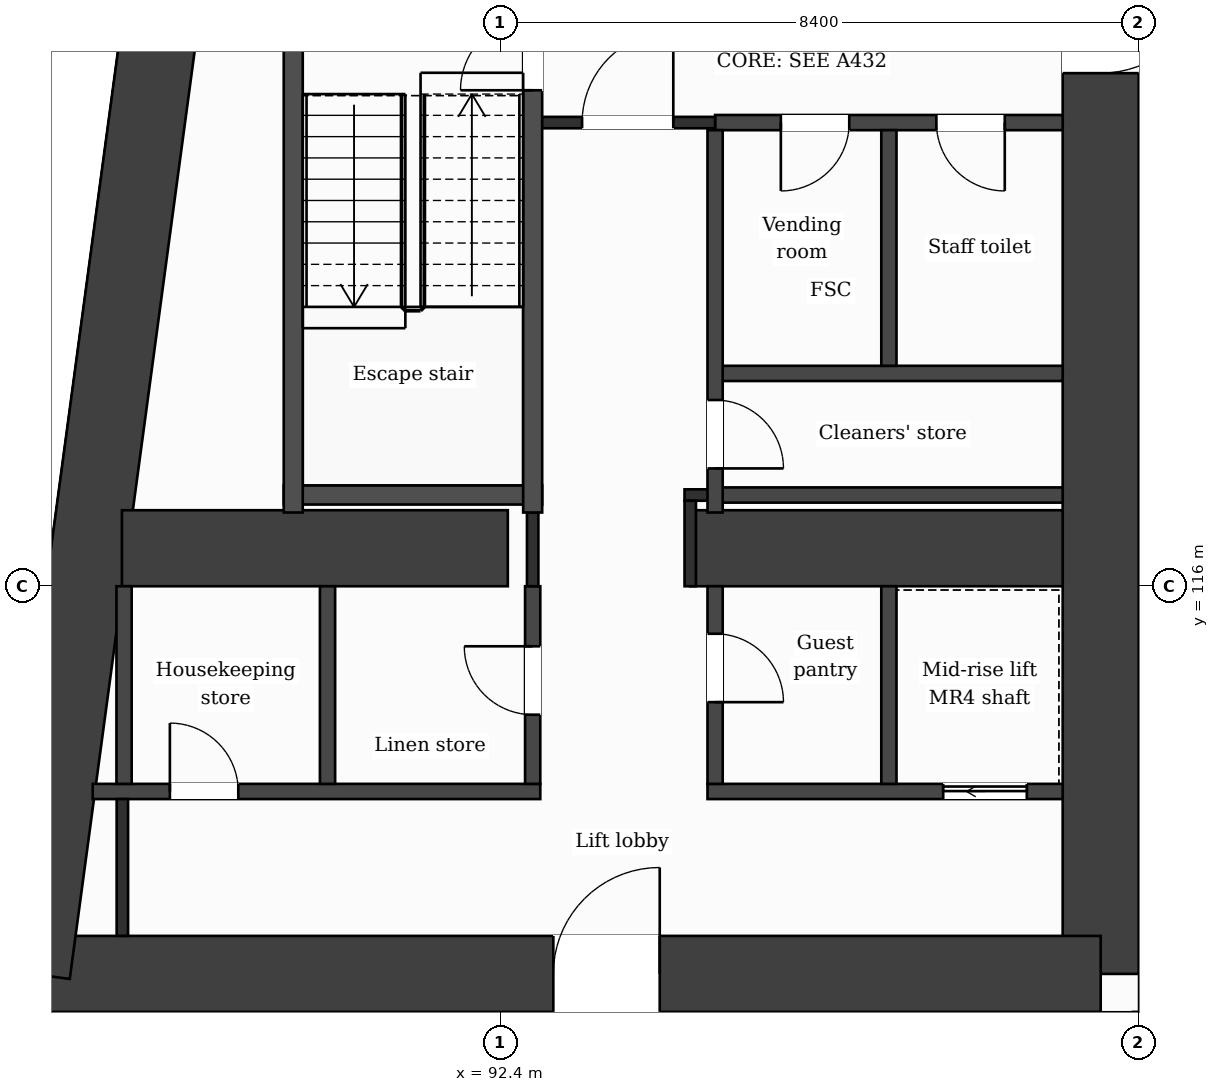
"""IFC4 building model, lengths in metres.
Left out: names, types, materials, properties, quantities, classifications, styles, units other than length and angle.
Written with IfcOpenShell. Run it as: python <this file> out.ifc"""

import sys

from ifc_helpers import new_model, si_unit, direction, frame, frame_2d, origin, place, context, subcontext, project, spatial, rectangle, extrude, element, fill, save


model = new_model("IFC4")
c1 = context("Model", 3, precision=1e-05, world=origin(), true_north=direction((0.0, 1.0)))
c2 = subcontext(c1, "Body", "Model", "MODEL_VIEW")
j1 = project(units=[si_unit("LENGTHUNIT", "METRE"), si_unit("PLANEANGLEUNIT", "RADIAN")], contexts=[c1])
p1 = place(None, origin())
s1 = spatial("IfcSite", under=j1, at=p1, CompositionType="ELEMENT")
p2 = place(p1, origin())
s2 = spatial("IfcBuilding", under=s1, at=p2, CompositionType="ELEMENT")
p3 = place(p2, frame((0.0, 0.0, 131.7)))
s3 = spatial("IfcBuildingStorey", under=s2, at=p3, CompositionType="ELEMENT", Elevation=131.7)
p4 = place(p3, frame((100.3, 131.9, 0.0), z_axis=(0.0, 0.0, 1.0), x_axis=(0.0, -1.0, 0.0)))
e1 = element("IfcWall", 1, at=p4, inside=s3, PredefinedType="SHEAR", context=c2, shape_type="SweptSolid", body=[
    extrude(rectangle(XDim=21.0, YDim=1.0, at=frame_2d((10.5, 0.0))), origin(), (0.0, 0.0, 1.0), 3.7),
])
p5 = place(p4, frame((7.75, 0.0, 0.0)))
e2 = element("IfcOpeningElement", 2, at=p5, cuts=e1, PredefinedType="OPENING", context=c2, shape_type="SweptSolid", body=[
    extrude(rectangle(XDim=1.4, YDim=2.1, at=frame_2d((0.7, 1.05))), frame((0.0, 0.51, 0.0), z_axis=(0.0, -1.0, 0.0), x_axis=(1.0, 0.0, 0.0)), (0.0, 0.0, 1.0), 1.02),
])
p6 = place(p3, frame((100.3, 110.9, 0.0), z_axis=(0.0, 0.0, 1.0), x_axis=(-1.0, 0.0, 0.0)))
e3 = element("IfcWall", 3, at=p6, inside=s3, PredefinedType="SHEAR", context=c2, shape_type="SweptSolid", body=[
    extrude(rectangle(XDim=14.059, YDim=1.0, at=frame_2d((7.03, 0.0))), origin(), (0.0, 0.0, 1.0), 3.7),
])
p7 = place(p6, frame((5.802, 0.0, 0.0)))
e4 = element("IfcOpeningElement", 4, at=p7, cuts=e3, PredefinedType="OPENING", context=c2, shape_type="SweptSolid", body=[
    extrude(rectangle(XDim=1.4, YDim=2.1, at=frame_2d((0.7, 1.05))), frame((0.0, 0.51, 0.0), z_axis=(0.0, -1.0, 0.0), x_axis=(1.0, 0.0, 0.0)), (0.0, 0.0, 1.0), 1.02),
])
p8 = place(p3, frame((86.241, 110.9, 0.0), z_axis=(0.0, 0.0, 1.0), x_axis=(0.133411141623, 0.991060778808, 0.0)))
e5 = element("IfcWall", 5, at=p8, inside=s3, PredefinedType="SHEAR", context=c2, shape_type="SweptSolid", body=[
    extrude(rectangle(XDim=21.189, YDim=1.0, at=frame_2d((10.595, 0.0))), origin(), (0.0, 0.0, 1.0), 3.7),
])
p9 = place(p3, frame((87.423, 116.5, 0.0), z_axis=(0.0, 0.0, 1.0), x_axis=(1.0, 0.0, 0.0)))
e6 = element("IfcWall", 6, at=p9, inside=s3, PredefinedType="SHEAR", context=c2, shape_type="SweptSolid", body=[
    extrude(rectangle(XDim=5.077, YDim=1.0, at=frame_2d((2.539, 0.0))), origin(), (0.0, 0.0, 1.0), 3.7),
])
p10 = place(p3, frame((94.9, 116.5, 0.0), z_axis=(0.0, 0.0, 1.0), x_axis=(1.0, 0.0, 0.0)))
e7 = element("IfcWall", 7, at=p10, inside=s3, PredefinedType="SHEAR", context=c2, shape_type="SweptSolid", body=[
    extrude(rectangle(XDim=4.9, YDim=1.0, at=frame_2d((2.45, 0.0))), origin(), (0.0, 0.0, 1.0), 3.7),
])
p11 = place(p3, frame((87.334, 110.4, 0.0), z_axis=(0.0, 0.0, 1.0), x_axis=(-0.133437175554, -0.991057273915, 0.0)))
e8 = element("IfcWall", 8, at=p11, inside=s3, PredefinedType="SOLIDWALL", context=c2, shape_type="SweptSolid", body=[
    extrude(rectangle(XDim=6.781, YDim=0.3, at=frame_2d((3.39, 0.0))), origin(), (0.0, 0.0, 1.0), 3.2),
])
p12 = place(p11, frame((1.418, 0.0, 0.0)))
e9 = element("IfcOpeningElement", 9, at=p12, cuts=e8, PredefinedType="OPENING", context=c2, shape_type="SweptSolid", body=[
    extrude(rectangle(XDim=1.2, YDim=2.4, at=frame_2d((0.6, 1.2))), frame((0.0, 0.16, 0.0), z_axis=(0.0, -1.0, 0.0), x_axis=(1.0, 0.0, 0.0)), (0.0, 0.0, 1.0), 0.32),
])
p13 = place(p11, frame((4.758, 0.0, 0.9)))
e10 = element("IfcOpeningElement", 10, at=p13, cuts=e8, PredefinedType="OPENING", context=c2, shape_type="SweptSolid", body=[
    extrude(rectangle(XDim=1.2, YDim=2.1, at=frame_2d((0.6, 1.05))), frame((0.0, 0.16, 0.0), z_axis=(0.0, -1.0, 0.0), x_axis=(1.0, 0.0, 0.0)), (0.0, 0.0, 1.0), 0.32),
])
p14 = place(p3, frame((87.039, 113.3, 0.0), z_axis=(0.0, 0.0, 1.0), x_axis=(1.0, 0.0, 0.0)))
e11 = element("IfcWall", 11, at=p14, inside=s3, PredefinedType="PARTITIONING", context=c2, shape_type="SweptSolid", body=[
    extrude(rectangle(XDim=5.888, YDim=0.2, at=frame_2d((2.944, 0.0))), origin(), (0.0, 0.0, 1.0), 3.2),
])
p15 = place(p14, frame((1.015, 0.0, 0.0)))
e12 = element("IfcOpeningElement", 12, at=p15, cuts=e11, PredefinedType="OPENING", context=c2, shape_type="SweptSolid", body=[
    extrude(rectangle(XDim=0.9, YDim=2.1, at=frame_2d((0.45, 1.05))), frame((0.0, 0.11, 0.0), z_axis=(0.0, -1.0, 0.0), x_axis=(1.0, 0.0, 0.0)), (0.0, 0.0, 1.0), 0.22),
])
p16 = place(p3, frame((95.127, 113.3, 0.0), z_axis=(0.0, 0.0, 1.0), x_axis=(1.0, 0.0, 0.0)))
e13 = element("IfcWall", 13, at=p16, inside=s3, PredefinedType="PARTITIONING", context=c2, shape_type="SweptSolid", body=[
    extrude(rectangle(XDim=4.673, YDim=0.2, at=frame_2d((2.336, 0.0))), origin(), (0.0, 0.0, 1.0), 3.2),
])
p17 = place(p16, frame((3.101, 0.0, 0.0)))
e14 = element("IfcOpeningElement", 14, at=p17, cuts=e13, PredefinedType="OPENING", context=c2, shape_type="SweptSolid", body=[
    extrude(rectangle(XDim=1.1, YDim=2.1, at=frame_2d((0.55, 1.05))), frame((0.0, 0.11, 0.0), z_axis=(0.0, -1.0, 0.0), x_axis=(1.0, 0.0, 0.0)), (0.0, 0.0, 1.0), 0.22),
])
p18 = place(p3, frame((95.227, 117.2, 0.0), z_axis=(0.0, 0.0, 1.0), x_axis=(1.0, 0.0, 0.0)))
e15 = element("IfcWall", 15, at=p18, inside=s3, PredefinedType="PARTITIONING", context=c2, shape_type="SweptSolid", body=[
    extrude(rectangle(XDim=4.573, YDim=0.2, at=frame_2d((2.287, 0.0))), origin(), (0.0, 0.0, 1.0), 3.2),
])
p19 = place(p3, frame((94.825, 117.2, 0.0), z_axis=(0.0, 0.0, 1.0), x_axis=(1.0, 0.0, 0.0)))
e16 = element("IfcWall", 16, at=p19, inside=s3, PredefinedType="PARTITIONING", context=c2, shape_type="SweptSolid", body=[
    extrude(rectangle(XDim=0.402, YDim=0.15, at=frame_2d((0.201, 0.0))), origin(), (0.0, 0.0, 1.0), 3.2),
])
p20 = place(p3, frame((89.552, 117.2, 0.0), z_axis=(0.0, 0.0, 1.0), x_axis=(1.0, 0.0, 0.0)))
e17 = element("IfcWall", 17, at=p20, inside=s3, PredefinedType="PARTITIONING", context=c2, shape_type="SweptSolid", body=[
    extrude(rectangle(XDim=3.4, YDim=0.25, at=frame_2d((1.7, 0.0))), origin(), (0.0, 0.0, 1.0), 3.2),
])
p21 = place(p3, frame((95.227, 118.8, 0.0), z_axis=(0.0, 0.0, 1.0), x_axis=(1.0, 0.0, 0.0)))
e18 = element("IfcWall", 18, at=p21, inside=s3, PredefinedType="PARTITIONING", context=c2, shape_type="SweptSolid", body=[
    extrude(rectangle(XDim=4.573, YDim=0.2, at=frame_2d((2.287, 0.0))), origin(), (0.0, 0.0, 1.0), 3.2),
])
p22 = place(p3, frame((95.227, 122.1, 0.0), z_axis=(0.0, 0.0, 1.0), x_axis=(1.0, 0.0, 0.0)))
e19 = element("IfcWall", 19, at=p22, inside=s3, PredefinedType="PARTITIONING", context=c2, shape_type="SweptSolid", body=[
    extrude(rectangle(XDim=4.573, YDim=0.2, at=frame_2d((2.287, 0.0))), origin(), (0.0, 0.0, 1.0), 3.2),
])
p23 = place(p22, frame((0.865, 0.0, 0.0)))
e20 = element("IfcOpeningElement", 20, at=p23, cuts=e19, PredefinedType="OPENING", context=c2, shape_type="SweptSolid", body=[
    extrude(rectangle(XDim=0.9, YDim=2.1, at=frame_2d((0.45, 1.05))), frame((0.0, 0.11, 0.0), z_axis=(0.0, -1.0, 0.0), x_axis=(1.0, 0.0, 0.0)), (0.0, 0.0, 1.0), 0.22),
])
p24 = place(p22, frame((2.911, 0.0, 0.0)))
e21 = element("IfcOpeningElement", 21, at=p24, cuts=e19, PredefinedType="OPENING", context=c2, shape_type="SweptSolid", body=[
    extrude(rectangle(XDim=0.9, YDim=2.1, at=frame_2d((0.45, 1.05))), frame((0.0, 0.11, 0.0), z_axis=(0.0, -1.0, 0.0), x_axis=(1.0, 0.0, 0.0)), (0.0, 0.0, 1.0), 0.22),
])
p25 = place(p3, frame((92.827, 122.1, 0.0), z_axis=(0.0, 0.0, 1.0), x_axis=(1.0, 0.0, 0.0)))
e22 = element("IfcWall", 22, at=p25, inside=s3, PredefinedType="PARTITIONING", context=c2, shape_type="SweptSolid", body=[
    extrude(rectangle(XDim=2.4, YDim=0.15, at=frame_2d((1.2, 0.0))), origin(), (0.0, 0.0, 1.0), 3.2),
])
p26 = place(p25, frame((0.65, 0.0, 0.0)))
e23 = element("IfcOpeningElement", 23, at=p26, cuts=e22, PredefinedType="OPENING", context=c2, shape_type="SweptSolid", body=[
    extrude(rectangle(XDim=1.2, YDim=2.1, at=frame_2d((0.6, 1.05))), frame((0.0, 0.085, 0.0), z_axis=(0.0, -1.0, 0.0), x_axis=(1.0, 0.0, 0.0)), (0.0, 0.0, 1.0), 0.17),
])
p27 = place(p3, frame((87.451, 113.4, 0.0), z_axis=(0.0, 0.0, 1.0), x_axis=(0.0, 1.0, 0.0)))
e24 = element("IfcWall", 24, at=p27, inside=s3, PredefinedType="PARTITIONING", context=c2, shape_type="SweptSolid", body=[
    extrude(rectangle(XDim=2.6, YDim=0.2, at=frame_2d((1.3, 0.0))), origin(), (0.0, 0.0, 1.0), 3.2),
])
p28 = place(p3, frame((87.429, 111.4, 0.0), z_axis=(0.0, 0.0, 1.0), x_axis=(0.0, 1.0, 0.0)))
e25 = element("IfcWall", 25, at=p28, inside=s3, PredefinedType="PARTITIONING", context=c2, shape_type="SweptSolid", body=[
    extrude(rectangle(XDim=1.8, YDim=0.15, at=frame_2d((0.9, 0.0))), origin(), (0.0, 0.0, 1.0), 3.2),
])
p29 = place(p3, frame((89.677, 116.97, 0.0), z_axis=(0.0, 0.0, 1.0), x_axis=(0.0, 1.0, 0.0)))
e26 = element("IfcWall", 26, at=p29, inside=s3, PredefinedType="PARTITIONING", context=c2, shape_type="SweptSolid", body=[
    extrude(rectangle(XDim=6.855, YDim=0.25, at=frame_2d((3.427, 0.0))), origin(), (0.0, 0.0, 1.0), 3.2),
])
p30 = place(p3, frame((90.128, 113.4, 0.0), z_axis=(0.0, 0.0, 1.0), x_axis=(0.0, 1.0, 0.0)))
e27 = element("IfcWall", 27, at=p30, inside=s3, PredefinedType="PARTITIONING", context=c2, shape_type="SweptSolid", body=[
    extrude(rectangle(XDim=2.6, YDim=0.2, at=frame_2d((1.3, 0.0))), origin(), (0.0, 0.0, 1.0), 3.2),
])
p31 = place(p3, frame((92.827, 113.4, 0.0), z_axis=(0.0, 0.0, 1.0), x_axis=(0.0, 1.0, 0.0)))
e28 = element("IfcWall", 28, at=p31, inside=s3, PredefinedType="PARTITIONING", context=c2, shape_type="SweptSolid", body=[
    extrude(rectangle(XDim=2.6, YDim=0.2, at=frame_2d((1.3, 0.0))), origin(), (0.0, 0.0, 1.0), 3.2),
])
p32 = place(p31, frame((0.91, 0.0, 0.0)))
e29 = element("IfcOpeningElement", 29, at=p32, cuts=e28, PredefinedType="OPENING", context=c2, shape_type="SweptSolid", body=[
    extrude(rectangle(XDim=0.9, YDim=2.1, at=frame_2d((0.45, 1.05))), frame((0.0, 0.11, 0.0), z_axis=(0.0, -1.0, 0.0), x_axis=(1.0, 0.0, 0.0)), (0.0, 0.0, 1.0), 0.22),
])
p33 = place(p3, frame((92.827, 116.0, 0.0), z_axis=(0.0, 0.0, 1.0), x_axis=(0.0, 1.0, 0.0)))
e30 = element("IfcWall", 30, at=p33, inside=s3, PredefinedType="PARTITIONING", context=c2, shape_type="SweptSolid", body=[
    extrude(rectangle(XDim=0.97, YDim=0.15, at=frame_2d((0.485, 0.0))), origin(), (0.0, 0.0, 1.0), 3.2),
])
p34 = place(p3, frame((92.827, 116.97, 0.0), z_axis=(0.0, 0.0, 1.0), x_axis=(0.0, 1.0, 0.0)))
e31 = element("IfcWall", 31, at=p34, inside=s3, PredefinedType="PARTITIONING", context=c2, shape_type="SweptSolid", body=[
    extrude(rectangle(XDim=6.855, YDim=0.25, at=frame_2d((3.427, 0.0))), origin(), (0.0, 0.0, 1.0), 3.2),
])
p35 = place(p34, frame((5.555, 0.0, 0.0)))
e32 = element("IfcOpeningElement", 32, at=p35, cuts=e31, PredefinedType="OPENING", context=c2, shape_type="SweptSolid", body=[
    extrude(rectangle(XDim=0.95, YDim=2.1, at=frame_2d((0.475, 1.05))), frame((0.0, 0.135, 0.0), z_axis=(0.0, -1.0, 0.0), x_axis=(1.0, 0.0, 0.0)), (0.0, 0.0, 1.0), 0.27),
])
p36 = place(p3, frame((94.9, 116.0, 0.0), z_axis=(0.0, 0.0, 1.0), x_axis=(0.0, 1.0, 0.0)))
e33 = element("IfcWall", 33, at=p36, inside=s3, PredefinedType="PARTITIONING", context=c2, shape_type="SweptSolid", body=[
    extrude(rectangle(XDim=1.125, YDim=0.15, at=frame_2d((0.562, 0.0))), origin(), (0.0, 0.0, 1.0), 3.2),
])
p37 = place(p3, frame((95.227, 113.4, 0.0), z_axis=(0.0, 0.0, 1.0), x_axis=(0.0, 1.0, 0.0)))
e34 = element("IfcWall", 34, at=p37, inside=s3, PredefinedType="PARTITIONING", context=c2, shape_type="SweptSolid", body=[
    extrude(rectangle(XDim=2.6, YDim=0.2, at=frame_2d((1.3, 0.0))), origin(), (0.0, 0.0, 1.0), 3.2),
])
p38 = place(p37, frame((1.075, 0.0, 0.0)))
e35 = element("IfcOpeningElement", 35, at=p38, cuts=e34, PredefinedType="OPENING", context=c2, shape_type="SweptSolid", body=[
    extrude(rectangle(XDim=0.9, YDim=2.1, at=frame_2d((0.45, 1.05))), frame((0.0, 0.11, 0.0), z_axis=(0.0, -1.0, 0.0), x_axis=(1.0, 0.0, 0.0)), (0.0, 0.0, 1.0), 0.22),
])
p39 = place(p3, frame((95.227, 116.97, 0.0), z_axis=(0.0, 0.0, 1.0), x_axis=(0.0, 1.0, 0.0)))
e36 = element("IfcWall", 36, at=p39, inside=s3, PredefinedType="PARTITIONING", context=c2, shape_type="SweptSolid", body=[
    extrude(rectangle(XDim=5.03, YDim=0.2, at=frame_2d((2.515, 0.0))), origin(), (0.0, 0.0, 1.0), 3.2),
])
p40 = place(p39, frame((0.58, 0.0, 0.0)))
e37 = element("IfcOpeningElement", 37, at=p40, cuts=e36, PredefinedType="OPENING", context=c2, shape_type="SweptSolid", body=[
    extrude(rectangle(XDim=0.9, YDim=2.1, at=frame_2d((0.45, 1.05))), frame((0.0, 0.11, 0.0), z_axis=(0.0, -1.0, 0.0), x_axis=(1.0, 0.0, 0.0)), (0.0, 0.0, 1.0), 0.22),
])
p41 = place(p3, frame((97.513, 113.4, 0.0), z_axis=(0.0, 0.0, 1.0), x_axis=(0.0, 1.0, 0.0)))
e38 = element("IfcWall", 38, at=p41, inside=s3, PredefinedType="PARTITIONING", context=c2, shape_type="SweptSolid", body=[
    extrude(rectangle(XDim=2.6, YDim=0.2, at=frame_2d((1.3, 0.0))), origin(), (0.0, 0.0, 1.0), 3.2),
])
p42 = place(p3, frame((97.513, 118.9, 0.0), z_axis=(0.0, 0.0, 1.0), x_axis=(0.0, 1.0, 0.0)))
e39 = element("IfcWall", 39, at=p42, inside=s3, PredefinedType="PARTITIONING", context=c2, shape_type="SweptSolid", body=[
    extrude(rectangle(XDim=3.1, YDim=0.2, at=frame_2d((1.55, 0.0))), origin(), (0.0, 0.0, 1.0), 3.2),
])
p43 = place(p3, frame((100.8, 109.075, 0.0), z_axis=(0.0, 0.0, 1.0), x_axis=(0.0, 1.0, 0.0)))
e40 = element("IfcWall", 40, at=p43, inside=s3, PredefinedType="PARTITIONING", context=c2, shape_type="SweptSolid", body=[
    extrude(rectangle(XDim=1.325, YDim=0.15, at=frame_2d((0.663, 0.0))), origin(), (0.0, 0.0, 1.0), 3.2),
])
p44 = place(p26, origin())
e41 = element("IfcDoor", 41, at=p44, inside=s3, OperationType="SINGLE_SWING_RIGHT", PredefinedType="DOOR", context=c2, shape_type="SweptSolid", body=[
    extrude(rectangle(XDim=1.2, YDim=2.1, at=frame_2d((0.6, 1.05))), frame((0.0, 0.025, 0.0), z_axis=(0.0, -1.0, 0.0), x_axis=(1.0, 0.0, 0.0)), (0.0, 0.0, 1.0), 0.05),
])
fill(e23, e41)
p45 = place(p23, origin())
e42 = element("IfcDoor", 42, at=p45, inside=s3, OperationType="SINGLE_SWING_LEFT", PredefinedType="DOOR", context=c2, shape_type="SweptSolid", body=[
    extrude(rectangle(XDim=0.9, YDim=2.1, at=frame_2d((0.45, 1.05))), frame((0.0, 0.025, 0.0), z_axis=(0.0, -1.0, 0.0), x_axis=(1.0, 0.0, 0.0)), (0.0, 0.0, 1.0), 0.05),
])
fill(e20, e42)
p46 = place(p24, origin())
e43 = element("IfcDoor", 43, at=p46, inside=s3, OperationType="SINGLE_SWING_RIGHT", PredefinedType="DOOR", context=c2, shape_type="SweptSolid", body=[
    extrude(rectangle(XDim=0.9, YDim=2.1, at=frame_2d((0.45, 1.05))), frame((0.0, 0.025, 0.0), z_axis=(0.0, -1.0, 0.0), x_axis=(1.0, 0.0, 0.0)), (0.0, 0.0, 1.0), 0.05),
])
fill(e21, e43)
p47 = place(p35, origin())
e44 = element("IfcDoor", 44, at=p47, inside=s3, OperationType="SINGLE_SWING_LEFT", PredefinedType="DOOR", context=c2, shape_type="SweptSolid", body=[
    extrude(rectangle(XDim=0.95, YDim=2.1, at=frame_2d((0.475, 1.05))), frame((0.0, 0.025, 0.0), z_axis=(0.0, -1.0, 0.0), x_axis=(1.0, 0.0, 0.0)), (0.0, 0.0, 1.0), 0.05),
])
fill(e32, e44)
p48 = place(p40, origin())
e45 = element("IfcDoor", 45, at=p48, inside=s3, OperationType="SINGLE_SWING_LEFT", PredefinedType="DOOR", context=c2, shape_type="SweptSolid", body=[
    extrude(rectangle(XDim=0.9, YDim=2.1, at=frame_2d((0.45, 1.05))), frame((0.0, 0.025, 0.0), z_axis=(0.0, -1.0, 0.0), x_axis=(1.0, 0.0, 0.0)), (0.0, 0.0, 1.0), 0.05),
])
fill(e37, e45)
p49 = place(p17, origin())
e46 = element("IfcDoor", 46, at=p49, inside=s3, OperationType="SLIDING_TO_LEFT", PredefinedType="DOOR", context=c2, shape_type="SweptSolid", body=[
    extrude(rectangle(XDim=1.1, YDim=2.1, at=frame_2d((0.55, 1.05))), frame((0.0, 0.025, 0.0), z_axis=(0.0, -1.0, 0.0), x_axis=(1.0, 0.0, 0.0)), (0.0, 0.0, 1.0), 0.05),
])
fill(e14, e46)
p50 = place(p15, origin())
e47 = element("IfcDoor", 47, at=p50, inside=s3, OperationType="SINGLE_SWING_LEFT", PredefinedType="DOOR", context=c2, shape_type="SweptSolid", body=[
    extrude(rectangle(XDim=0.9, YDim=2.1, at=frame_2d((0.45, 1.05))), frame((0.0, 0.025, 0.0), z_axis=(0.0, -1.0, 0.0), x_axis=(1.0, 0.0, 0.0)), (0.0, 0.0, 1.0), 0.05),
])
fill(e12, e47)
p51 = place(p32, origin())
e48 = element("IfcDoor", 48, at=p51, inside=s3, OperationType="SINGLE_SWING_RIGHT", PredefinedType="DOOR", context=c2, shape_type="SweptSolid", body=[
    extrude(rectangle(XDim=0.9, YDim=2.1, at=frame_2d((0.45, 1.05))), frame((0.0, 0.025, 0.0), z_axis=(0.0, -1.0, 0.0), x_axis=(1.0, 0.0, 0.0)), (0.0, 0.0, 1.0), 0.05),
])
fill(e29, e48)
p52 = place(p38, origin())
e49 = element("IfcDoor", 49, at=p52, inside=s3, OperationType="SINGLE_SWING_LEFT", PredefinedType="DOOR", context=c2, shape_type="SweptSolid", body=[
    extrude(rectangle(XDim=0.9, YDim=2.1, at=frame_2d((0.45, 1.05))), frame((0.0, 0.025, 0.0), z_axis=(0.0, -1.0, 0.0), x_axis=(1.0, 0.0, 0.0)), (0.0, 0.0, 1.0), 0.05),
])
fill(e35, e49)
p53 = place(p7, origin())
e50 = element("IfcDoor", 50, at=p53, inside=s3, OperationType="SINGLE_SWING_LEFT", PredefinedType="DOOR", context=c2, shape_type="SweptSolid", body=[
    extrude(rectangle(XDim=1.4, YDim=2.1, at=frame_2d((0.7, 1.05))), frame((0.0, 0.025, 0.0), z_axis=(0.0, -1.0, 0.0), x_axis=(1.0, 0.0, 0.0)), (0.0, 0.0, 1.0), 0.05),
])
fill(e4, e50)
p54 = place(p5, origin())
e51 = element("IfcDoor", 51, at=p54, inside=s3, OperationType="SINGLE_SWING_LEFT", PredefinedType="DOOR", context=c2, shape_type="SweptSolid", body=[
    extrude(rectangle(XDim=1.4, YDim=2.1, at=frame_2d((0.7, 1.05))), frame((0.0, 0.025, 0.0), z_axis=(0.0, -1.0, 0.0), x_axis=(1.0, 0.0, 0.0)), (0.0, 0.0, 1.0), 0.05),
])
fill(e2, e51)
save(model, sys.argv[1])
